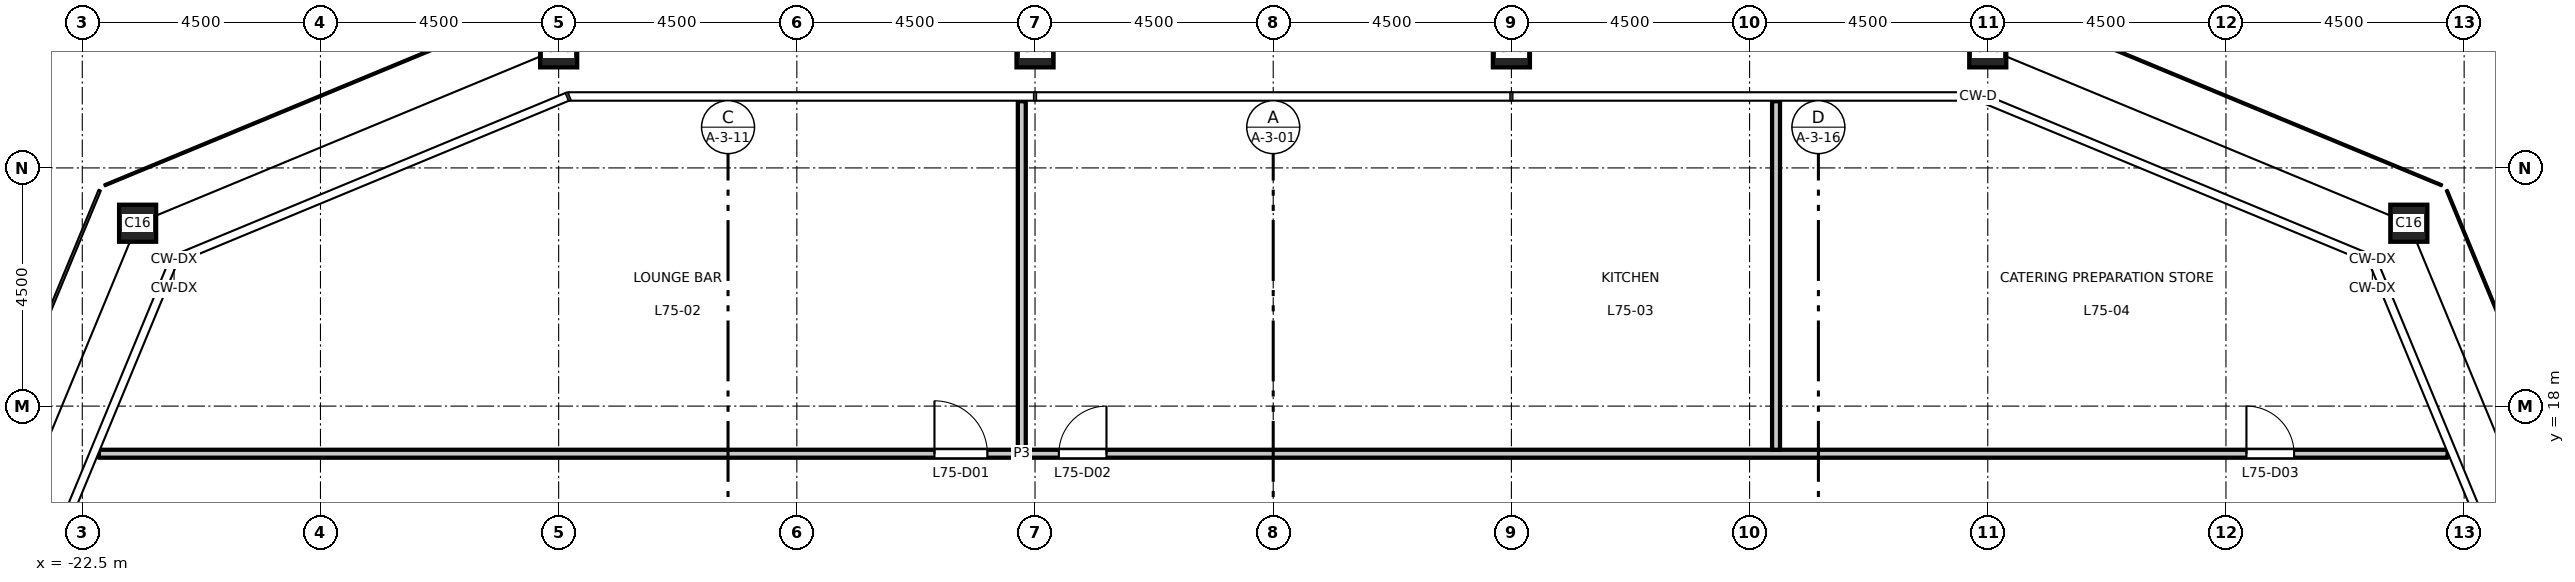
"""IFC4 building model, lengths in metres.
Left out: names, types, materials, properties, quantities, classifications, styles, units other than length and angle.
Written with IfcOpenShell. Run it as: python <this file> out.ifc"""

import sys

from ifc_helpers import new_model, si_unit, direction, frame, frame_2d, origin, origin_2d, place, context, subcontext, project, spatial, rectangle, hollow_rectangle, extrude, element, fill, save


model = new_model("IFC4")
c1 = context("Model", 3, precision=1e-05, world=origin(), true_north=direction((0.0, 1.0)))
c2 = subcontext(c1, "Body", "Model", "MODEL_VIEW")
j1 = project(units=[si_unit("LENGTHUNIT", "METRE"), si_unit("PLANEANGLEUNIT", "RADIAN")], contexts=[c1])
p1 = place(None, origin())
s1 = spatial("IfcSite", under=j1, at=p1, CompositionType="ELEMENT")
p2 = place(p1, origin())
s2 = spatial("IfcBuilding", under=s1, at=p2, CompositionType="ELEMENT")
p3 = place(p2, frame((0.0, 0.0, 348.2)))
s3 = spatial("IfcBuildingStorey", under=s2, at=p3, CompositionType="ELEMENT", Elevation=348.2)
for number, where, z_axis, x_axis in (
    (1, (21.455, 21.455, 0.0), (0.0, 0.0, 1.0), (1.0, 0.0, 0.0)),
    (2, (13.5, 24.75, 0.0), (0.0, 0.0, 1.0), (1.0, 0.0, 0.0)),
    (3, (4.5, 24.75, 0.0), (0.0, 0.0, 1.0), (1.0, 0.0, 0.0)),
    (4, (-4.5, 24.75, 0.0), (0.0, 0.0, 1.0), (1.0, 0.0, 0.0)),
    (5, (-13.5, 24.75, 0.0), (0.0, 0.0, 1.0), (1.0, 0.0, 0.0)),
    (6, (-21.455, 21.455, 0.0), (0.0, 0.0, 1.0), (1.0, 0.0, 0.0)),
):
    element("IfcColumn", number, at=place(p3, frame(where, z_axis=z_axis, x_axis=x_axis)), inside=s3, PredefinedType="COLUMN", context=c2, shape_type="SweptSolid", body=[
        extrude(hollow_rectangle(XDim=0.7, YDim=0.7, WallThickness=0.036, at=origin_2d()), origin(), (0.0, 0.0, 1.0), 5.0),
    ])
p4 = place(p3, frame((-22.187, 17.1, 0.0), z_axis=(0.0, 0.0, 1.0), x_axis=(1.0, 0.0, 0.0)))
e7 = element("IfcWall", 7, at=p4, inside=s3, PredefinedType="PARTITIONING", context=c2, shape_type="SweptSolid", body=[
    extrude(rectangle(XDim=17.437, YDim=0.15, at=frame_2d((8.719, 0.0))), origin(), (0.0, 0.0, 1.0), 4.8),
])
p5 = place(p4, frame((15.787, 0.0, 0.0)))
e8 = element("IfcOpeningElement", 8, at=p5, cuts=e7, PredefinedType="OPENING", context=c2, shape_type="SweptSolid", body=[
    extrude(rectangle(XDim=1.0, YDim=2.1, at=frame_2d((0.5, 1.05))), frame((0.0, 0.085, 0.0), z_axis=(0.0, -1.0, 0.0), x_axis=(1.0, 0.0, 0.0)), (0.0, 0.0, 1.0), 0.17),
])
p6 = place(p3, frame((-4.75, 17.1, 0.0), z_axis=(0.0, 0.0, 1.0), x_axis=(1.0, 0.0, 0.0)))
e9 = element("IfcWall", 9, at=p6, inside=s3, PredefinedType="PARTITIONING", context=c2, shape_type="SweptSolid", body=[
    extrude(rectangle(XDim=26.937, YDim=0.15, at=frame_2d((13.469, 0.0))), origin(), (0.0, 0.0, 1.0), 4.8),
])
p7 = place(p6, frame((0.7, 0.0, 0.0)))
e10 = element("IfcOpeningElement", 10, at=p7, cuts=e9, PredefinedType="OPENING", context=c2, shape_type="SweptSolid", body=[
    extrude(rectangle(XDim=0.9, YDim=2.1, at=frame_2d((0.45, 1.05))), frame((0.0, 0.085, 0.0), z_axis=(0.0, -1.0, 0.0), x_axis=(1.0, 0.0, 0.0)), (0.0, 0.0, 1.0), 0.17),
])
p8 = place(p6, frame((23.137, 0.0, 0.0)))
e11 = element("IfcOpeningElement", 11, at=p8, cuts=e9, PredefinedType="OPENING", context=c2, shape_type="SweptSolid", body=[
    extrude(rectangle(XDim=0.9, YDim=2.1, at=frame_2d((0.45, 1.05))), frame((0.0, 0.085, 0.0), z_axis=(0.0, -1.0, 0.0), x_axis=(1.0, 0.0, 0.0)), (0.0, 0.0, 1.0), 0.17),
])
for number, where, z_axis, x_axis in (
    (12, (-4.75, 17.175, 0.0), (0.0, 0.0, 1.0), (0.0, 1.0, 0.0)),
    (13, (9.5, 17.175, 0.0), (0.0, 0.0, 1.0), (0.0, 1.0, 0.0)),
):
    element("IfcWall", number, at=place(p3, frame(where, z_axis=z_axis, x_axis=x_axis)), inside=s3, PredefinedType="PARTITIONING", context=c2, shape_type="SweptSolid", body=[
        extrude(rectangle(XDim=6.585, YDim=0.15, at=frame_2d((3.292, 0.0))), origin(), (0.0, 0.0, 1.0), 4.8),
    ])
p9 = place(p5, origin())
e14 = element("IfcDoor", 14, at=p9, inside=s3, OperationType="SINGLE_SWING_LEFT", PredefinedType="DOOR", context=c2, shape_type="SweptSolid", body=[
    extrude(rectangle(XDim=1.0, YDim=2.1, at=frame_2d((0.5, 1.05))), frame((0.0, 0.025, 0.0), z_axis=(0.0, -1.0, 0.0), x_axis=(1.0, 0.0, 0.0)), (0.0, 0.0, 1.0), 0.05),
])
fill(e8, e14)
p10 = place(p7, origin())
e15 = element("IfcDoor", 15, at=p10, inside=s3, OperationType="SINGLE_SWING_RIGHT", PredefinedType="DOOR", context=c2, shape_type="SweptSolid", body=[
    extrude(rectangle(XDim=0.9, YDim=2.1, at=frame_2d((0.45, 1.05))), frame((0.0, 0.025, 0.0), z_axis=(0.0, -1.0, 0.0), x_axis=(1.0, 0.0, 0.0)), (0.0, 0.0, 1.0), 0.05),
])
fill(e10, e15)
p11 = place(p8, origin())
e16 = element("IfcDoor", 16, at=p11, inside=s3, OperationType="SINGLE_SWING_LEFT", PredefinedType="DOOR", context=c2, shape_type="SweptSolid", body=[
    extrude(rectangle(XDim=0.9, YDim=2.1, at=frame_2d((0.45, 1.05))), frame((0.0, 0.025, 0.0), z_axis=(0.0, -1.0, 0.0), x_axis=(1.0, 0.0, 0.0)), (0.0, 0.0, 1.0), 0.05),
])
fill(e11, e16)
save(model, sys.argv[1])
